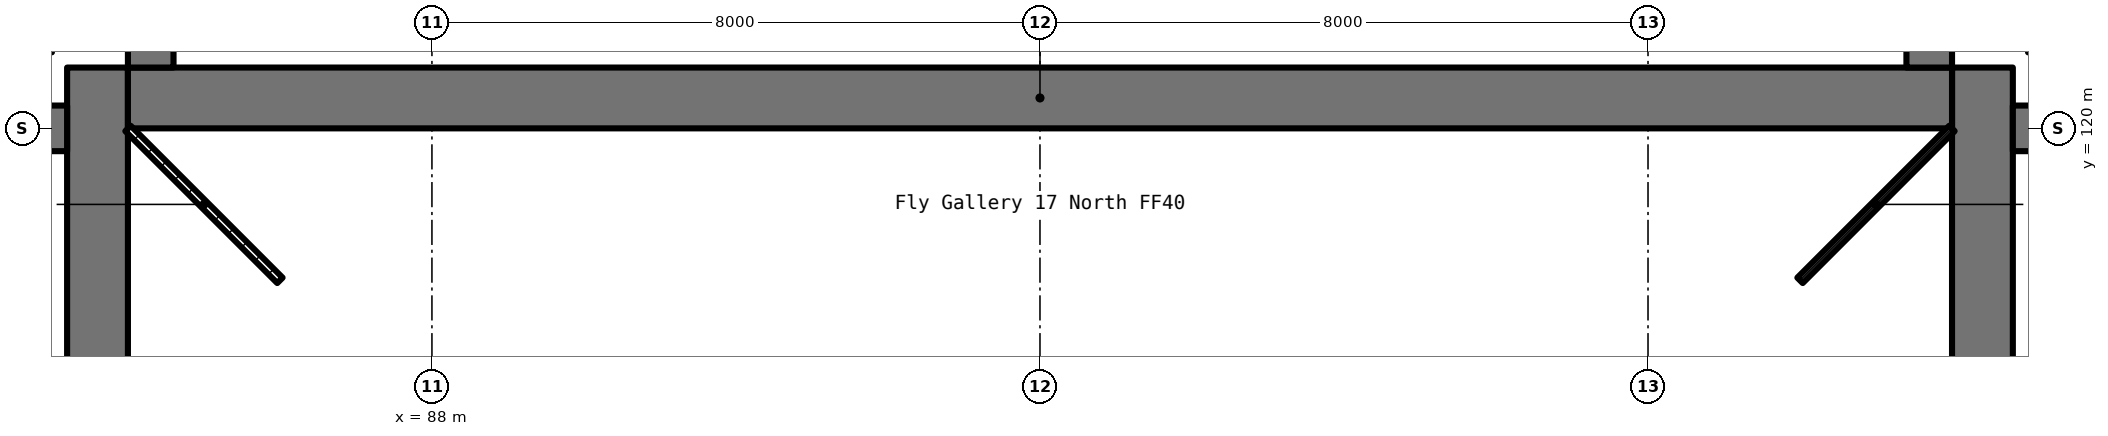
"""IFC4 building model, lengths in metres.
Left out: names, types, materials, properties, quantities, classifications, styles, units other than length and angle.
Written with IfcOpenShell. Run it as: python <this file> out.ifc"""

import sys

from ifc_helpers import new_model, si_unit, direction, frame, frame_2d, origin, place, context, subcontext, project, spatial, rectangle, extrude, element, save


model = new_model("IFC4")
c1 = context("Model", 3, precision=1e-05, world=origin(), true_north=direction((0.0, 1.0)))
c2 = subcontext(c1, "Body", "Model", "MODEL_VIEW")
j1 = project(units=[si_unit("LENGTHUNIT", "METRE"), si_unit("PLANEANGLEUNIT", "RADIAN")], contexts=[c1])
p1 = place(None, origin())
s1 = spatial("IfcSite", under=j1, at=p1, CompositionType="ELEMENT")
p2 = place(p1, origin())
s2 = spatial("IfcBuilding", under=s1, at=p2, CompositionType="ELEMENT")
p3 = place(p2, frame((0.0, 0.0, 17.0)))
s3 = spatial("IfcBuildingStorey", under=s2, at=p3, CompositionType="ELEMENT", Elevation=17.0)
for number, where, z_axis, x_axis in (
    (1, (83.6, 95.2, 0.0), (0.0, 0.0, 1.0), (0.0, 1.0, 0.0)),
    (2, (108.4, 95.2, 0.0), (0.0, 0.0, 1.0), (0.0, 1.0, 0.0)),
):
    element("IfcWall", number, at=place(p3, frame(where, z_axis=z_axis, x_axis=x_axis)), inside=s3, PredefinedType="SHEAR", context=c2, shape_type="SweptSolid", body=[
        extrude(rectangle(XDim=25.6, YDim=0.8, at=frame_2d((12.8, 0.0))), origin(), (0.0, 0.0, 1.0), 5.5),
    ])
p4 = place(p3, frame((84.0, 120.4, 0.0), z_axis=(0.0, 0.0, 1.0), x_axis=(1.0, 0.0, 0.0)))
e3 = element("IfcWall", 3, at=p4, inside=s3, PredefinedType="SHEAR", context=c2, shape_type="SweptSolid", body=[
    extrude(rectangle(XDim=24.0, YDim=0.8, at=frame_2d((12.0, 0.0))), origin(), (0.0, 0.0, 1.0), 5.5),
])
p5 = place(p3, frame((60.6, 120.0, 0.0), z_axis=(0.0, 0.0, 1.0), x_axis=(1.0, 0.0, 0.0)))
e4 = element("IfcWall", 4, at=p5, inside=s3, PredefinedType="SHEAR", context=c2, shape_type="SweptSolid", body=[
    extrude(rectangle(XDim=22.6, YDim=0.6, at=frame_2d((11.3, 0.0))), origin(), (0.0, 0.0, 1.0), 2.88),
])
p6 = place(p5, frame((4.917, 0.0, 1.4)))
e5 = element("IfcOpeningElement", 5, at=p6, cuts=e4, PredefinedType="OPENING", context=c2, shape_type="SweptSolid", body=[
    extrude(rectangle(XDim=1.5, YDim=1.0, at=frame_2d((0.75, 0.5))), frame((0.0, 0.312, 0.0), z_axis=(0.0, -1.0, 0.0), x_axis=(1.0, 0.0, 0.0)), (0.0, 0.0, 1.0), 0.624),
])
p7 = place(p5, frame((10.55, 0.0, 1.4)))
e6 = element("IfcOpeningElement", 6, at=p7, cuts=e4, PredefinedType="OPENING", context=c2, shape_type="SweptSolid", body=[
    extrude(rectangle(XDim=1.5, YDim=1.0, at=frame_2d((0.75, 0.5))), frame((0.0, 0.312, 0.0), z_axis=(0.0, -1.0, 0.0), x_axis=(1.0, 0.0, 0.0)), (0.0, 0.0, 1.0), 0.624),
])
p8 = place(p5, frame((16.183, 0.0, 1.4)))
e7 = element("IfcOpeningElement", 7, at=p8, cuts=e4, PredefinedType="OPENING", context=c2, shape_type="SweptSolid", body=[
    extrude(rectangle(XDim=1.5, YDim=1.0, at=frame_2d((0.75, 0.5))), frame((0.0, 0.312, 0.0), z_axis=(0.0, -1.0, 0.0), x_axis=(1.0, 0.0, 0.0)), (0.0, 0.0, 1.0), 0.624),
])
p9 = place(p3, frame((108.8, 120.0, 0.0), z_axis=(0.0, 0.0, 1.0), x_axis=(1.0, 0.0, 0.0)))
e8 = element("IfcWall", 8, at=p9, inside=s3, PredefinedType="SHEAR", context=c2, shape_type="SweptSolid", body=[
    extrude(rectangle(XDim=22.6, YDim=0.6, at=frame_2d((11.3, 0.0))), origin(), (0.0, 0.0, 1.0), 2.88),
])
p10 = place(p9, frame((4.917, 0.0, 1.4)))
e9 = element("IfcOpeningElement", 9, at=p10, cuts=e8, PredefinedType="OPENING", context=c2, shape_type="SweptSolid", body=[
    extrude(rectangle(XDim=1.5, YDim=1.0, at=frame_2d((0.75, 0.5))), frame((0.0, 0.312, 0.0), z_axis=(0.0, -1.0, 0.0), x_axis=(1.0, 0.0, 0.0)), (0.0, 0.0, 1.0), 0.624),
])
p11 = place(p9, frame((10.55, 0.0, 1.4)))
e10 = element("IfcOpeningElement", 10, at=p11, cuts=e8, PredefinedType="OPENING", context=c2, shape_type="SweptSolid", body=[
    extrude(rectangle(XDim=1.5, YDim=1.0, at=frame_2d((0.75, 0.5))), frame((0.0, 0.312, 0.0), z_axis=(0.0, -1.0, 0.0), x_axis=(1.0, 0.0, 0.0)), (0.0, 0.0, 1.0), 0.624),
])
p12 = place(p9, frame((16.183, 0.0, 1.4)))
e11 = element("IfcOpeningElement", 11, at=p12, cuts=e8, PredefinedType="OPENING", context=c2, shape_type="SweptSolid", body=[
    extrude(rectangle(XDim=1.5, YDim=1.0, at=frame_2d((0.75, 0.5))), frame((0.0, 0.312, 0.0), z_axis=(0.0, -1.0, 0.0), x_axis=(1.0, 0.0, 0.0)), (0.0, 0.0, 1.0), 0.624),
])
p13 = place(p3, frame((84.3, 120.8, 0.0), z_axis=(0.0, 0.0, 1.0), x_axis=(0.0, 1.0, 0.0)))
e12 = element("IfcWall", 12, at=p13, inside=s3, PredefinedType="SHEAR", context=c2, shape_type="SweptSolid", body=[
    extrude(rectangle(XDim=15.2, YDim=0.6, at=frame_2d((7.6, 0.0))), origin(), (0.0, 0.0, 1.0), 5.5),
])
p14 = place(p13, frame((2.6, 0.0, 1.4)))
e13 = element("IfcOpeningElement", 13, at=p14, cuts=e12, PredefinedType="OPENING", context=c2, shape_type="SweptSolid", body=[
    extrude(rectangle(XDim=2.4, YDim=1.0, at=frame_2d((1.2, 0.5))), frame((0.0, 0.312, 0.0), z_axis=(0.0, -1.0, 0.0), x_axis=(1.0, 0.0, 0.0)), (0.0, 0.0, 1.0), 0.624),
])
p15 = place(p13, frame((10.2, 0.0, 1.4)))
e14 = element("IfcOpeningElement", 14, at=p15, cuts=e12, PredefinedType="OPENING", context=c2, shape_type="SweptSolid", body=[
    extrude(rectangle(XDim=2.4, YDim=1.0, at=frame_2d((1.2, 0.5))), frame((0.0, 0.312, 0.0), z_axis=(0.0, -1.0, 0.0), x_axis=(1.0, 0.0, 0.0)), (0.0, 0.0, 1.0), 0.624),
])
p16 = place(p3, frame((107.7, 120.8, 0.0), z_axis=(0.0, 0.0, 1.0), x_axis=(0.0, 1.0, 0.0)))
e15 = element("IfcWall", 15, at=p16, inside=s3, PredefinedType="SHEAR", context=c2, shape_type="SweptSolid", body=[
    extrude(rectangle(XDim=15.2, YDim=0.6, at=frame_2d((7.6, 0.0))), origin(), (0.0, 0.0, 1.0), 5.5),
])
p17 = place(p16, frame((2.6, 0.0, 1.4)))
e16 = element("IfcOpeningElement", 16, at=p17, cuts=e15, PredefinedType="OPENING", context=c2, shape_type="SweptSolid", body=[
    extrude(rectangle(XDim=2.4, YDim=1.0, at=frame_2d((1.2, 0.5))), frame((0.0, 0.312, 0.0), z_axis=(0.0, -1.0, 0.0), x_axis=(1.0, 0.0, 0.0)), (0.0, 0.0, 1.0), 0.624),
])
p18 = place(p16, frame((10.2, 0.0, 1.4)))
e17 = element("IfcOpeningElement", 17, at=p18, cuts=e15, PredefinedType="OPENING", context=c2, shape_type="SweptSolid", body=[
    extrude(rectangle(XDim=2.4, YDim=1.0, at=frame_2d((1.2, 0.5))), frame((0.0, 0.312, 0.0), z_axis=(0.0, -1.0, 0.0), x_axis=(1.0, 0.0, 0.0)), (0.0, 0.0, 1.0), 0.624),
])
for number, where, z_axis, x_axis in (
    (18, (84.001, 119.999, 0.0), (0.0, 0.0, 1.0), (0.707, -0.707, 0.0)),
    (19, (106.0, 118.0, 0.0), (0.0, 0.0, 1.0), (0.707, 0.707, 0.0)),
):
    element("IfcWall", number, at=place(p3, frame(where, z_axis=z_axis, x_axis=x_axis)), inside=s3, PredefinedType="PARTITIONING", context=c2, shape_type="SweptSolid", body=[
        extrude(rectangle(XDim=2.827, YDim=0.1, at=frame_2d((1.414, 0.0))), origin(), (0.0, 0.0, 1.0), 4.6),
    ])
save(model, sys.argv[1])
